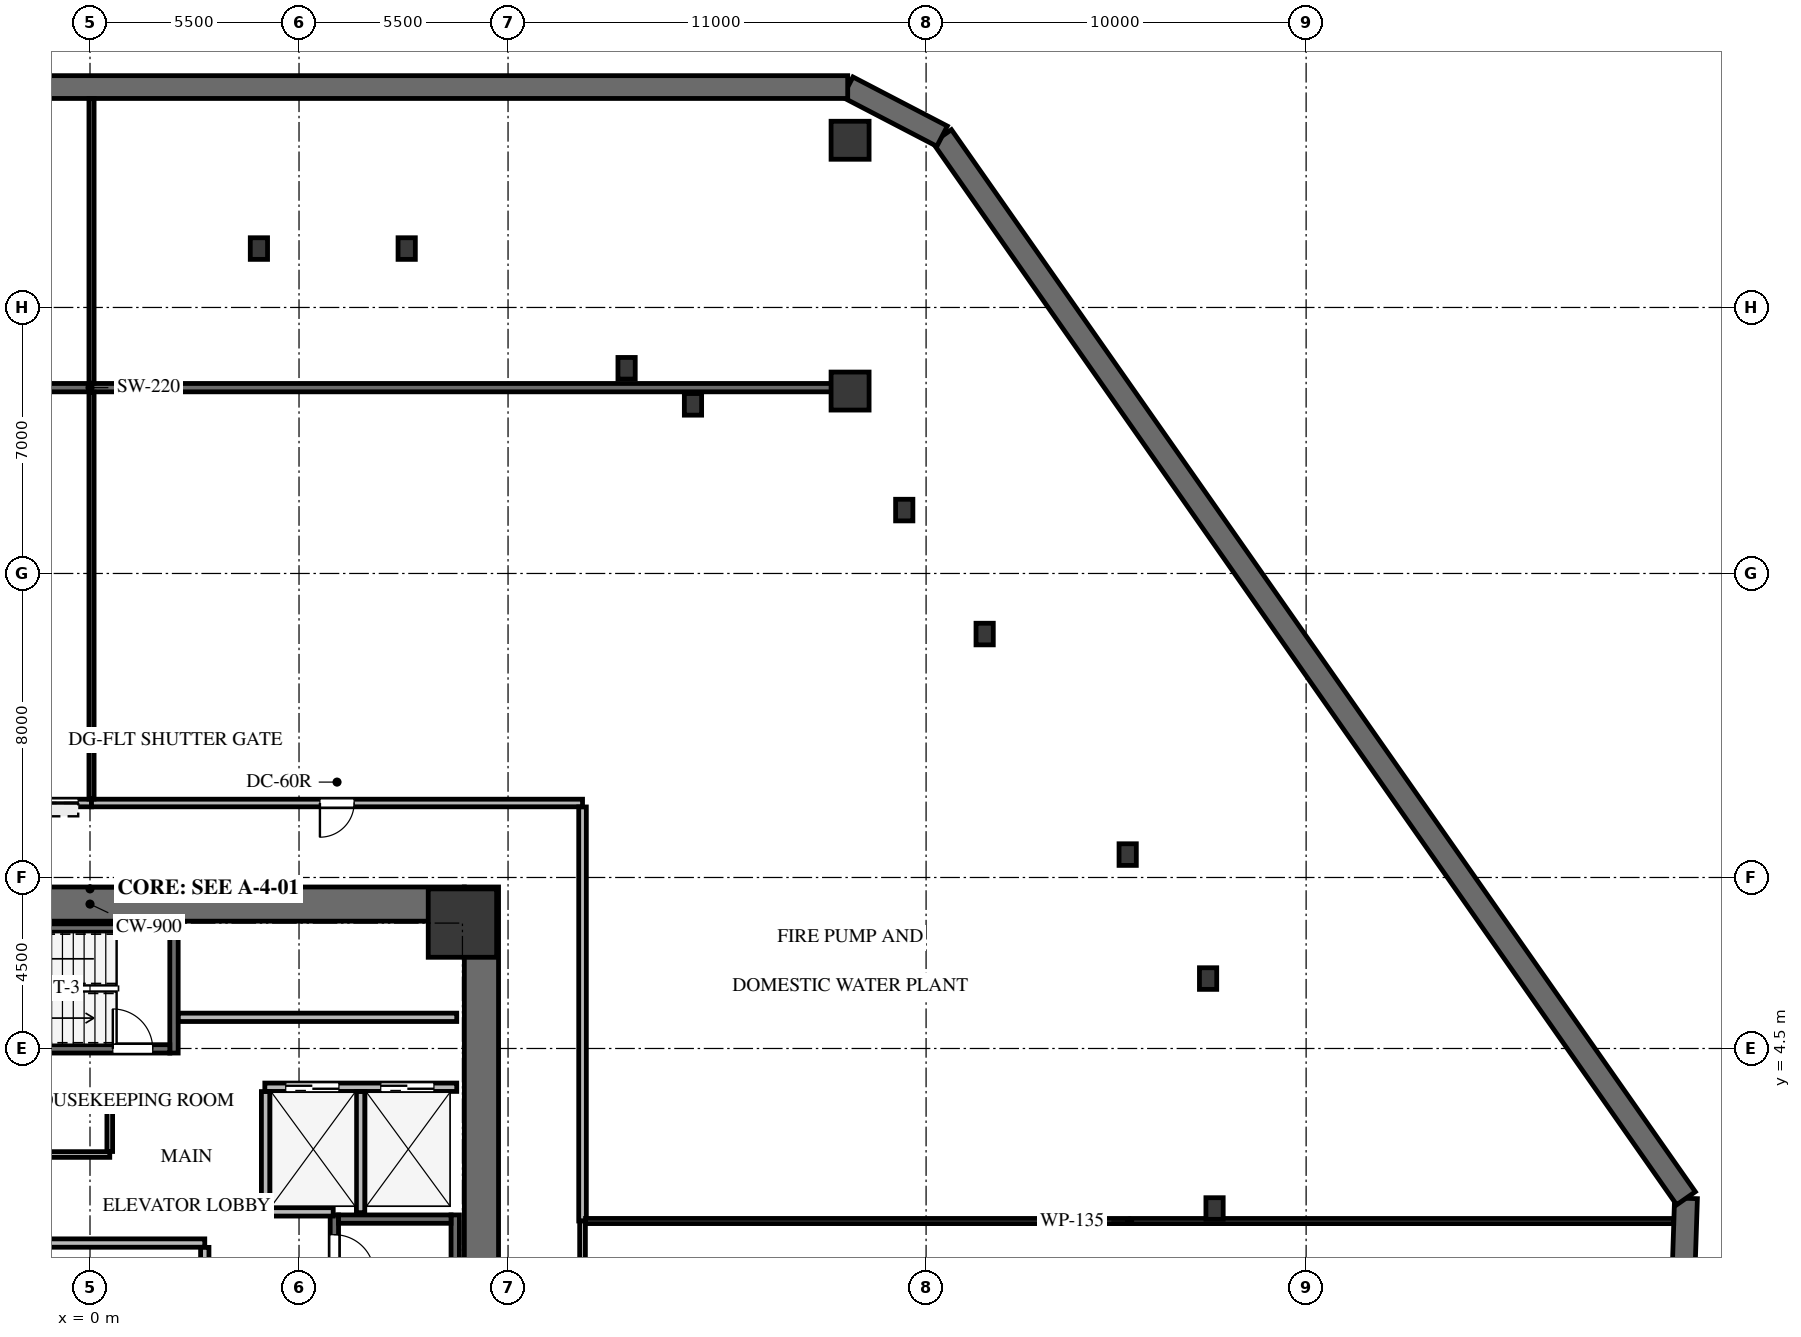
"""IFC4 building model, lengths in metres.
Left out: names, types, materials, properties, quantities, classifications, styles, units other than length and angle.
Written with IfcOpenShell. Run it as: python <this file> out.ifc"""

import sys

from ifc_helpers import new_model, si_unit, direction, frame, frame_2d, origin, origin_2d, place, context, subcontext, project, spatial, rectangle, i_section, extrude, source, transform, mapped, element, fill, save


model = new_model("IFC4")
c1 = context("Model", 3, precision=1e-05, world=origin(), true_north=direction((0.0, 1.0)))
c2 = subcontext(c1, "Body", "Model", "MODEL_VIEW")
j1 = project(units=[si_unit("LENGTHUNIT", "METRE"), si_unit("PLANEANGLEUNIT", "RADIAN")], contexts=[c1])
p1 = place(None, origin())
s1 = spatial("IfcSite", under=j1, at=p1, CompositionType="ELEMENT")
p2 = place(p1, origin())
s2 = spatial("IfcBuilding", under=s1, at=p2, CompositionType="ELEMENT")
p3 = place(p2, frame((0.0, 0.0, -10.0)))
s3 = spatial("IfcBuildingStorey", under=s2, at=p3, CompositionType="ELEMENT", Elevation=-10.0)
m1 = source(origin(), c2, "Body", "SweptSolid", [
    extrude(rectangle(XDim=1.0, YDim=1.0, at=origin_2d()), origin(), (0.0, 0.0, 1.0), 4.65),
])
for number, where, z_axis, x_axis in (
    (1, (20.0, 21.8, 0.0), (0.0, 0.0, 1.0), (1.0, 0.0, 0.0)),
    (2, (20.0, 28.4, 0.0), (0.0, 0.0, 1.0), (1.0, 0.0, 0.0)),
):
    element("IfcColumn", number, at=place(p3, frame(where, z_axis=z_axis, x_axis=x_axis)), inside=s3, PredefinedType="COLUMN", context=c2, shape_type="MappedRepresentation", body=[
        mapped(m1, transform((0.0, 0.0, 0.0), x_axis=(1.0, 0.0, 0.0), y_axis=(0.0, 1.0, 0.0), z_axis=(0.0, 0.0, 1.0), scale=1.0)),
    ])
p4 = place(p3, frame((-20.0, 21.89, 0.0), z_axis=(0.0, 0.0, 1.0), x_axis=(1.0, 0.0, 0.0)))
e3 = element("IfcWall", 3, at=p4, inside=s3, PredefinedType="SHEAR", context=c2, shape_type="SweptSolid", body=[
    extrude(rectangle(XDim=40.0, YDim=0.22, at=frame_2d((20.0, 0.0))), origin(), (0.0, 0.0, 1.0), 4.6),
])
p5 = place(p3, frame((41.904, -2.24, 0.0), z_axis=(0.0, 0.0, 1.0), x_axis=(0.032870651185, 0.999459614137, 0.0)))
e4 = element("IfcWall", 4, at=p5, inside=s3, PredefinedType="USERDEFINED", context=c2, shape_type="SweptSolid", body=[
    extrude(rectangle(XDim=2.8, YDim=0.6, at=frame_2d((1.4, 0.0))), origin(), (0.0, 0.0, 1.0), 5.0),
])
p6 = place(p3, frame((41.996, 0.558, 0.0), z_axis=(0.0, 0.0, 1.0), x_axis=(-0.573667370151, 0.819088364234, 0.0)))
e5 = element("IfcWall", 5, at=p6, inside=s3, PredefinedType="USERDEFINED", context=c2, shape_type="SweptSolid", body=[
    extrude(rectangle(XDim=34.122, YDim=0.6, at=frame_2d((17.061, 0.0))), origin(), (0.0, 0.0, 1.0), 5.0),
])
p7 = place(p3, frame((22.421, 28.507, 0.0), z_axis=(0.0, 0.0, 1.0), x_axis=(-0.887001141035, 0.461767231192, 0.0)))
e6 = element("IfcWall", 6, at=p7, inside=s3, PredefinedType="USERDEFINED", context=c2, shape_type="SweptSolid", body=[
    extrude(rectangle(XDim=2.8, YDim=0.6, at=frame_2d((1.4, 0.0))), origin(), (0.0, 0.0, 1.0), 5.0),
])
p8 = place(p3, frame((19.938, 29.8, 0.0), z_axis=(0.0, 0.0, 1.0), x_axis=(-1.0, 0.0, 0.0)))
e7 = element("IfcWall", 7, at=p8, inside=s3, PredefinedType="USERDEFINED", context=c2, shape_type="SweptSolid", body=[
    extrude(rectangle(XDim=38.149, YDim=0.6, at=frame_2d((19.075, 0.0))), origin(), (0.0, 0.0, 1.0), 5.0),
])
p9 = place(p3, frame((10.3, -8.75, 0.0), z_axis=(0.0, 0.0, 1.0), x_axis=(0.0, 1.0, 0.0)))
e8 = element("IfcWall", 8, at=p9, inside=s3, PredefinedType="SHEAR", context=c2, shape_type="SweptSolid", body=[
    extrude(rectangle(XDim=17.5, YDim=0.9, at=frame_2d((8.75, 0.0))), origin(), (0.0, 0.0, 1.0), 5.0),
])
p10 = place(p3, frame((-9.85, 8.3, 0.0), z_axis=(0.0, 0.0, 1.0), x_axis=(1.0, 0.0, 0.0)))
e9 = element("IfcWall", 9, at=p10, inside=s3, PredefinedType="SHEAR", context=c2, shape_type="SweptSolid", body=[
    extrude(rectangle(XDim=19.7, YDim=0.9, at=frame_2d((9.85, 0.0))), origin(), (0.0, 0.0, 1.0), 5.0),
])
p11 = place(p3, frame((9.61, -7.77, 0.0), z_axis=(0.0, 0.0, 1.0), x_axis=(0.0, 1.0, 0.0)))
e10 = element("IfcWall", 10, at=p11, inside=s3, PredefinedType="SHEAR", context=c2, shape_type="SweptSolid", body=[
    extrude(rectangle(XDim=7.89, YDim=0.22, at=frame_2d((3.945, 0.0))), origin(), (0.0, 0.0, 1.0), 4.65),
])
p12 = place(p3, frame((6.43, 0.12, 0.0), z_axis=(0.0, 0.0, 1.0), x_axis=(0.0, -1.0, 0.0)))
e11 = element("IfcWall", 11, at=p12, inside=s3, PredefinedType="SHEAR", context=c2, shape_type="SweptSolid", body=[
    extrude(rectangle(XDim=7.89, YDim=0.22, at=frame_2d((3.945, 0.0))), origin(), (0.0, 0.0, 1.0), 4.65),
])
p13 = place(p12, frame((0.52, 0.0, 0.0)))
e12 = element("IfcOpeningElement", 12, at=p13, cuts=e11, PredefinedType="OPENING", context=c2, shape_type="SweptSolid", body=[
    extrude(rectangle(XDim=1.05, YDim=2.15, at=frame_2d((0.525, 1.075))), frame((0.0, 0.12, 0.0), z_axis=(0.0, -1.0, 0.0), x_axis=(1.0, 0.0, 0.0)), (0.0, 0.0, 1.0), 0.24),
])
p14 = place(p3, frame((9.5, 0.01, 0.0), z_axis=(0.0, 0.0, 1.0), x_axis=(-1.0, 0.0, 0.0)))
e13 = element("IfcWall", 13, at=p14, inside=s3, PredefinedType="SHEAR", context=c2, shape_type="SweptSolid", body=[
    extrude(rectangle(XDim=2.96, YDim=0.22, at=frame_2d((1.48, 0.0))), origin(), (0.0, 0.0, 1.0), 4.65),
])
p15 = place(p3, frame((2.21, 4.38, 0.0), z_axis=(0.0, 0.0, 1.0), x_axis=(0.0, 1.0, 0.0)))
e14 = element("IfcWall", 14, at=p15, inside=s3, PredefinedType="SHEAR", context=c2, shape_type="SweptSolid", body=[
    extrude(rectangle(XDim=3.4, YDim=0.22, at=frame_2d((1.7, 0.0))), origin(), (0.0, 0.0, 1.0), 4.65),
])
p16 = place(p3, frame((-5.25, 4.49, 0.0), z_axis=(0.0, 0.0, 1.0), x_axis=(1.0, 0.0, 0.0)))
e15 = element("IfcWall", 15, at=p16, inside=s3, PredefinedType="SHEAR", context=c2, shape_type="SweptSolid", body=[
    extrude(rectangle(XDim=7.35, YDim=0.22, at=frame_2d((3.675, 0.0))), origin(), (0.0, 0.0, 1.0), 4.65),
])
p17 = place(p16, frame((5.85, 0.0, 0.0)))
e16 = element("IfcOpeningElement", 16, at=p17, cuts=e15, PredefinedType="OPENING", context=c2, shape_type="SweptSolid", body=[
    extrude(rectangle(XDim=1.05, YDim=2.15, at=frame_2d((0.525, 1.075))), frame((0.0, 0.12, 0.0), z_axis=(0.0, -1.0, 0.0), x_axis=(1.0, 0.0, 0.0)), (0.0, 0.0, 1.0), 0.24),
])
p18 = place(p3, frame((2.1, 7.67, 0.0), z_axis=(0.0, 0.0, 1.0), x_axis=(-1.0, 0.0, 0.0)))
e17 = element("IfcWall", 17, at=p18, inside=s3, PredefinedType="SHEAR", context=c2, shape_type="SweptSolid", body=[
    extrude(rectangle(XDim=7.35, YDim=0.22, at=frame_2d((3.675, 0.0))), origin(), (0.0, 0.0, 1.0), 4.65),
])
m2 = source(origin(), c2, "Body", "SweptSolid", [
    extrude(rectangle(XDim=1.8, YDim=1.8, at=origin_2d()), origin(), (0.0, 0.0, 1.0), 4.65),
])
p19 = place(p3, frame((9.8, 7.8, 0.0), z_axis=(0.0, 0.0, 1.0), x_axis=(1.0, 0.0, 0.0)))
e18 = element("IfcColumn", 18, at=p19, inside=s3, PredefinedType="COLUMN", context=c2, shape_type="MappedRepresentation", body=[
    mapped(m2, transform((0.0, 0.0, 0.0), x_axis=(1.0, 0.0, 0.0), y_axis=(0.0, 1.0, 0.0), z_axis=(0.0, 0.0, 1.0), scale=1.0)),
])
m3 = source(origin(), c2, "Body", "SweptSolid", [
    extrude(i_section(OverallWidth=0.454, OverallDepth=0.569, WebThickness=0.078, FlangeThickness=0.125, FilletRadius=0.031, at=origin_2d()), origin(), (0.0, 0.0, 1.0), 4.65),
])
for number, where, z_axis, x_axis in (
    (19, (14.119, 22.4, 0.0), (0.0, 0.0, 1.0), (1.0, 0.0, 0.0)),
    (20, (15.866, 21.451, 0.0), (0.0, 0.0, 1.0), (1.0, 0.0, 0.0)),
    (21, (29.591, 0.289, 0.0), (0.0, 0.0, 1.0), (1.0, 0.0, 0.0)),
    (22, (29.42, 6.34, 0.0), (0.0, 0.0, 1.0), (1.0, 0.0, 0.0)),
    (23, (27.305, 9.603, 0.0), (0.0, 0.0, 1.0), (1.0, 0.0, 0.0)),
    (24, (23.541, 15.406, 0.0), (0.0, 0.0, 1.0), (1.0, 0.0, 0.0)),
    (25, (21.425, 18.668, 0.0), (0.0, 0.0, 1.0), (1.0, 0.0, 0.0)),
    (26, (8.333, 25.55, 0.0), (0.0, 0.0, 1.0), (1.0, 0.0, 0.0)),
    (27, (4.445, 25.55, 0.0), (0.0, 0.0, 1.0), (1.0, 0.0, 0.0)),
):
    element("IfcColumn", number, at=place(p3, frame(where, z_axis=z_axis, x_axis=x_axis)), inside=s3, PredefinedType="COLUMN", context=c2, shape_type="MappedRepresentation", body=[
        mapped(m3, transform((0.0, 0.0, 0.0), x_axis=(1.0, 0.0, 0.0), y_axis=(0.0, 1.0, 0.0), z_axis=(0.0, 0.0, 1.0), scale=1.0)),
    ])
p20 = place(p3, frame((4.6, 3.48, 0.0), z_axis=(0.0, 0.0, 1.0), x_axis=(1.0, 0.0, 0.0)))
e28 = element("IfcWall", 28, at=p20, inside=s3, PredefinedType="SOLIDWALL", context=c2, shape_type="SweptSolid", body=[
    extrude(rectangle(XDim=5.05, YDim=0.22, at=frame_2d((2.525, 0.0))), origin(), (0.0, 0.0, 1.0), 4.635),
])
p21 = place(p20, frame((0.55, 0.0, 0.0)))
e29 = element("IfcOpeningElement", 29, at=p21, cuts=e28, PredefinedType="OPENING", context=c2, shape_type="SweptSolid", body=[
    extrude(rectangle(XDim=1.4, YDim=2.15, at=frame_2d((0.7, 1.075))), frame((0.0, 0.12, 0.0), z_axis=(0.0, -1.0, 0.0), x_axis=(1.0, 0.0, 0.0)), (0.0, 0.0, 1.0), 0.24),
])
p22 = place(p20, frame((3.05, 0.0, 0.0)))
e30 = element("IfcOpeningElement", 30, at=p22, cuts=e28, PredefinedType="OPENING", context=c2, shape_type="SweptSolid", body=[
    extrude(rectangle(XDim=1.4, YDim=2.15, at=frame_2d((0.7, 1.075))), frame((0.0, 0.12, 0.0), z_axis=(0.0, -1.0, 0.0), x_axis=(1.0, 0.0, 0.0)), (0.0, 0.0, 1.0), 0.24),
])
for number, where, z_axis, x_axis in (
    (31, (4.62, 0.18, 0.0), (0.0, 0.0, 1.0), (0.0, 1.0, 0.0)),
    (32, (7.12, 0.18, 0.0), (0.0, 0.0, 1.0), (0.0, 1.0, 0.0)),
):
    element("IfcWall", number, at=place(p3, frame(where, z_axis=z_axis, x_axis=x_axis)), inside=s3, PredefinedType="SOLIDWALL", context=c2, shape_type="SweptSolid", body=[
        extrude(rectangle(XDim=3.186, YDim=0.22, at=frame_2d((1.593, 0.0))), origin(), (0.0, 0.0, 1.0), 4.635),
    ])
p23 = place(p3, frame((4.734, 0.2, 0.0), z_axis=(0.0, 0.0, 1.0), x_axis=(1.0, 0.0, 0.0)))
e33 = element("IfcWall", 33, at=p23, inside=s3, PredefinedType="SOLIDWALL", context=c2, shape_type="SweptSolid", body=[
    extrude(rectangle(XDim=1.666, YDim=0.22, at=frame_2d((0.833, 0.0))), origin(), (0.0, 0.0, 1.0), 4.635),
])
p24 = place(p3, frame((-4.22, -0.62, 0.0), z_axis=(0.0, 0.0, 1.0), x_axis=(1.0, 0.0, 0.0)))
e34 = element("IfcWall", 34, at=p24, inside=s3, PredefinedType="SOLIDWALL", context=c2, shape_type="SweptSolid", body=[
    extrude(rectangle(XDim=7.24, YDim=0.22, at=frame_2d((3.62, 0.0))), origin(), (0.0, 0.0, 1.0), 4.635),
])
p25 = place(p3, frame((3.02, -2.866, 0.0), z_axis=(0.0, 0.0, 1.0), x_axis=(0.0, 1.0, 0.0)))
e35 = element("IfcWall", 35, at=p25, inside=s3, PredefinedType="SOLIDWALL", context=c2, shape_type="SweptSolid", body=[
    extrude(rectangle(XDim=2.132, YDim=0.22, at=frame_2d((1.066, 0.0))), origin(), (0.0, 0.0, 1.0), 4.635),
])
p26 = place(p3, frame((2.325, 5.32, 0.0), z_axis=(0.0, 0.0, 1.0), x_axis=(1.0, 0.0, 0.0)))
e36 = element("IfcWall", 36, at=p26, inside=s3, PredefinedType="SOLIDWALL", context=c2, shape_type="SweptSolid", body=[
    extrude(rectangle(XDim=7.325, YDim=0.22, at=frame_2d((3.663, 0.0))), origin(), (0.0, 0.0, 1.0), 4.635),
])
p27 = place(p3, frame((0.52, 1.71, 0.0), z_axis=(0.0, 0.0, 1.0), x_axis=(-1.0, 0.0, 0.0)))
e37 = element("IfcWall", 37, at=p27, inside=s3, PredefinedType="PARTITIONING", context=c2, shape_type="SweptSolid", body=[
    extrude(rectangle(XDim=5.816, YDim=0.15, at=frame_2d((2.908, 0.0))), origin(), (0.0, 0.0, 1.0), 4.635),
])
p28 = place(p27, frame((2.458, 0.0, 0.0)))
e38 = element("IfcOpeningElement", 38, at=p28, cuts=e37, PredefinedType="OPENING", context=c2, shape_type="SweptSolid", body=[
    extrude(rectangle(XDim=0.9, YDim=2.05, at=frame_2d((0.45, 1.025))), frame((0.0, 0.085, 0.0), z_axis=(0.0, -1.0, 0.0), x_axis=(1.0, 0.0, 0.0)), (0.0, 0.0, 1.0), 0.17),
])
p29 = place(p3, frame((0.52, 3.3, 0.0), z_axis=(0.0, 0.0, 1.0), x_axis=(0.0, -1.0, 0.0)))
e39 = element("IfcWall", 39, at=p29, inside=s3, PredefinedType="PARTITIONING", context=c2, shape_type="SweptSolid", body=[
    extrude(rectangle(XDim=1.511, YDim=0.15, at=frame_2d((0.755, 0.0))), origin(), (0.0, 0.0, 1.0), 4.635),
])
p30 = place(p3, frame((0.04, 10.96, 0.0), z_axis=(0.0, 0.0, 1.0), x_axis=(-1.0, 0.0, 0.0)))
e40 = element("IfcWall", 40, at=p30, inside=s3, PredefinedType="SOLIDWALL", context=c2, shape_type="SweptSolid", body=[
    extrude(rectangle(XDim=13.0, YDim=0.2, at=frame_2d((6.5, 0.0))), origin(), (0.0, 0.0, 1.0), 3.629),
])
p31 = place(p30, frame((6.05, 0.0, 0.0)))
e41 = element("IfcOpeningElement", 41, at=p31, cuts=e40, PredefinedType="OPENING", context=c2, shape_type="SweptSolid", body=[
    extrude(rectangle(XDim=0.9, YDim=2.05, at=frame_2d((0.45, 1.025))), frame((0.0, 0.11, 0.0), z_axis=(0.0, -1.0, 0.0), x_axis=(1.0, 0.0, 0.0)), (0.0, 0.0, 1.0), 0.22),
])
p32 = place(p30, frame((0.35, 0.0, 0.0)))
e42 = element("IfcOpeningElement", 42, at=p32, cuts=e40, PredefinedType="OPENING", context=c2, shape_type="SweptSolid", body=[
    extrude(rectangle(XDim=2.8, YDim=2.4, at=frame_2d((1.4, 1.2))), frame((0.0, 0.11, 0.0), z_axis=(0.0, -1.0, 0.0), x_axis=(1.0, 0.0, 0.0)), (0.0, 0.0, 1.0), 0.22),
])
p33 = place(p3, frame((12.96, 10.96, 0.0), z_axis=(0.0, 0.0, 1.0), x_axis=(-1.0, 0.0, 0.0)))
e43 = element("IfcWall", 43, at=p33, inside=s3, PredefinedType="SOLIDWALL", context=c2, shape_type="SweptSolid", body=[
    extrude(rectangle(XDim=12.92, YDim=0.2, at=frame_2d((6.46, 0.0))), origin(), (0.0, 0.0, 1.0), 3.629),
])
p34 = place(p33, frame((6.01, 0.0, 0.0)))
e44 = element("IfcOpeningElement", 44, at=p34, cuts=e43, PredefinedType="OPENING", context=c2, shape_type="SweptSolid", body=[
    extrude(rectangle(XDim=0.9, YDim=2.05, at=frame_2d((0.45, 1.025))), frame((0.0, 0.11, 0.0), z_axis=(0.0, -1.0, 0.0), x_axis=(1.0, 0.0, 0.0)), (0.0, 0.0, 1.0), 0.22),
])
p35 = place(p3, frame((12.96, -0.04, 0.0), z_axis=(0.0, 0.0, 1.0), x_axis=(0.0, 1.0, 0.0)))
e45 = element("IfcWall", 45, at=p35, inside=s3, PredefinedType="SOLIDWALL", context=c2, shape_type="SweptSolid", body=[
    extrude(rectangle(XDim=10.896, YDim=0.2, at=frame_2d((5.448, 0.0))), origin(), (0.0, 0.0, 1.0), 3.629),
])
p36 = place(p3, frame((12.96, -10.881, 0.0), z_axis=(0.0, 0.0, 1.0), x_axis=(0.0, 1.0, 0.0)))
e46 = element("IfcWall", 46, at=p36, inside=s3, PredefinedType="PARTITIONING", context=c2, shape_type="SweptSolid", body=[
    extrude(rectangle(XDim=10.841, YDim=0.15, at=frame_2d((5.42, 0.0))), origin(), (0.0, 0.0, 1.0), 3.629),
])
p37 = place(p3, frame((0.04, 29.495, 0.0), z_axis=(0.0, 0.0, 1.0), x_axis=(0.0, -1.0, 0.0)))
e47 = element("IfcWall", 47, at=p37, inside=s3, PredefinedType="PARTITIONING", context=c2, shape_type="SweptSolid", body=[
    extrude(rectangle(XDim=7.49, YDim=0.135, at=frame_2d((3.745, 0.0))), origin(), (0.0, 0.0, 1.0), 3.944),
])
p38 = place(p3, frame((0.04, 21.775, 0.0), z_axis=(0.0, 0.0, 1.0), x_axis=(0.0, -1.0, 0.0)))
e48 = element("IfcWall", 48, at=p38, inside=s3, PredefinedType="PARTITIONING", context=c2, shape_type="SweptSolid", body=[
    extrude(rectangle(XDim=10.711, YDim=0.135, at=frame_2d((5.355, 0.0))), origin(), (0.0, 0.0, 1.0), 4.635),
])
p39 = place(p3, frame((41.671, -0.041, 0.0), z_axis=(0.0, 0.0, 1.0), x_axis=(-0.999999999091, 4.2634469e-05, 0.0)))
e49 = element("IfcWall", 49, at=p39, inside=s3, PredefinedType="PARTITIONING", context=c2, shape_type="SweptSolid", body=[
    extrude(rectangle(XDim=28.632, YDim=0.135, at=frame_2d((14.316, 0.0))), origin(), (0.0, 0.0, 1.0), 3.629),
])
m4 = source(origin(), c2, "Body", "SweptSolid", [
    extrude(rectangle(XDim=1.05, YDim=2.15, at=frame_2d((0.525, 1.075))), frame((0.0, 0.025, 0.0), z_axis=(0.0, -1.0, 0.0), x_axis=(1.0, 0.0, 0.0)), (0.0, 0.0, 1.0), 0.05),
])
p40 = place(p13, origin())
e50 = element("IfcDoor", 50, at=p40, inside=s3, OperationType="SINGLE_SWING_RIGHT", PredefinedType="DOOR", context=c2, shape_type="MappedRepresentation", body=[
    mapped(m4, transform((0.0, 0.0, 0.0), x_axis=(1.0, 0.0, 0.0), y_axis=(0.0, 1.0, 0.0), z_axis=(0.0, 0.0, 1.0), scale=1.0)),
])
fill(e12, e50)
m5 = source(origin(), c2, "Body", "SweptSolid", [
    extrude(rectangle(XDim=1.05, YDim=2.15, at=frame_2d((0.525, 1.075))), frame((0.0, 0.025, 0.0), z_axis=(0.0, -1.0, 0.0), x_axis=(1.0, 0.0, 0.0)), (0.0, 0.0, 1.0), 0.05),
])
p41 = place(p17, origin())
e51 = element("IfcDoor", 51, at=p41, inside=s3, OperationType="SINGLE_SWING_LEFT", PredefinedType="DOOR", context=c2, shape_type="MappedRepresentation", body=[
    mapped(m5, transform((0.0, 0.0, 0.0), x_axis=(1.0, 0.0, 0.0), y_axis=(0.0, 1.0, 0.0), z_axis=(0.0, 0.0, 1.0), scale=1.0)),
])
fill(e16, e51)
m6 = source(origin(), c2, "Body", "SweptSolid", [
    extrude(rectangle(XDim=1.4, YDim=2.15, at=frame_2d((0.7, 1.075))), frame((0.0, 0.025, 0.0), z_axis=(0.0, -1.0, 0.0), x_axis=(1.0, 0.0, 0.0)), (0.0, 0.0, 1.0), 0.05),
])
p42 = place(p21, origin())
e52 = element("IfcDoor", 52, at=p42, inside=s3, OperationType="DOUBLE_DOOR_SLIDING", PredefinedType="DOOR", context=c2, shape_type="MappedRepresentation", body=[
    mapped(m6, transform((0.0, 0.0, 0.0), x_axis=(1.0, 0.0, 0.0), y_axis=(0.0, 1.0, 0.0), z_axis=(0.0, 0.0, 1.0), scale=1.0)),
])
fill(e29, e52)
p43 = place(p22, origin())
e53 = element("IfcDoor", 53, at=p43, inside=s3, OperationType="DOUBLE_DOOR_SLIDING", PredefinedType="DOOR", context=c2, shape_type="MappedRepresentation", body=[
    mapped(m6, transform((0.0, 0.0, 0.0), x_axis=(1.0, 0.0, 0.0), y_axis=(0.0, 1.0, 0.0), z_axis=(0.0, 0.0, 1.0), scale=1.0)),
])
fill(e30, e53)
m7 = source(origin(), c2, "Body", "SweptSolid", [
    extrude(rectangle(XDim=0.9, YDim=2.05, at=frame_2d((0.45, 1.025))), frame((0.0, 0.025, 0.0), z_axis=(0.0, -1.0, 0.0), x_axis=(1.0, 0.0, 0.0)), (0.0, 0.0, 1.0), 0.05),
])
p44 = place(p34, origin())
e54 = element("IfcDoor", 54, at=p44, inside=s3, OperationType="SINGLE_SWING_RIGHT", PredefinedType="DOOR", context=c2, shape_type="MappedRepresentation", body=[
    mapped(m7, transform((0.0, 0.0, 0.0), x_axis=(1.0, 0.0, 0.0), y_axis=(0.0, 1.0, 0.0), z_axis=(0.0, 0.0, 1.0), scale=1.0)),
])
fill(e44, e54)
m8 = source(origin(), c2, "Body", "SweptSolid", [
    extrude(rectangle(XDim=2.8, YDim=2.4, at=frame_2d((1.4, 1.2))), frame((0.0, 0.025, 0.0), z_axis=(0.0, -1.0, 0.0), x_axis=(1.0, 0.0, 0.0)), (0.0, 0.0, 1.0), 0.05),
])
p45 = place(p32, origin())
e55 = element("IfcDoor", 55, at=p45, inside=s3, OperationType="ROLLINGUP", PredefinedType="GATE", context=c2, shape_type="MappedRepresentation", body=[
    mapped(m8, transform((0.0, 0.0, 0.0), x_axis=(1.0, 0.0, 0.0), y_axis=(0.0, 1.0, 0.0), z_axis=(0.0, 0.0, 1.0), scale=1.0)),
])
fill(e42, e55)
save(model, sys.argv[1])
